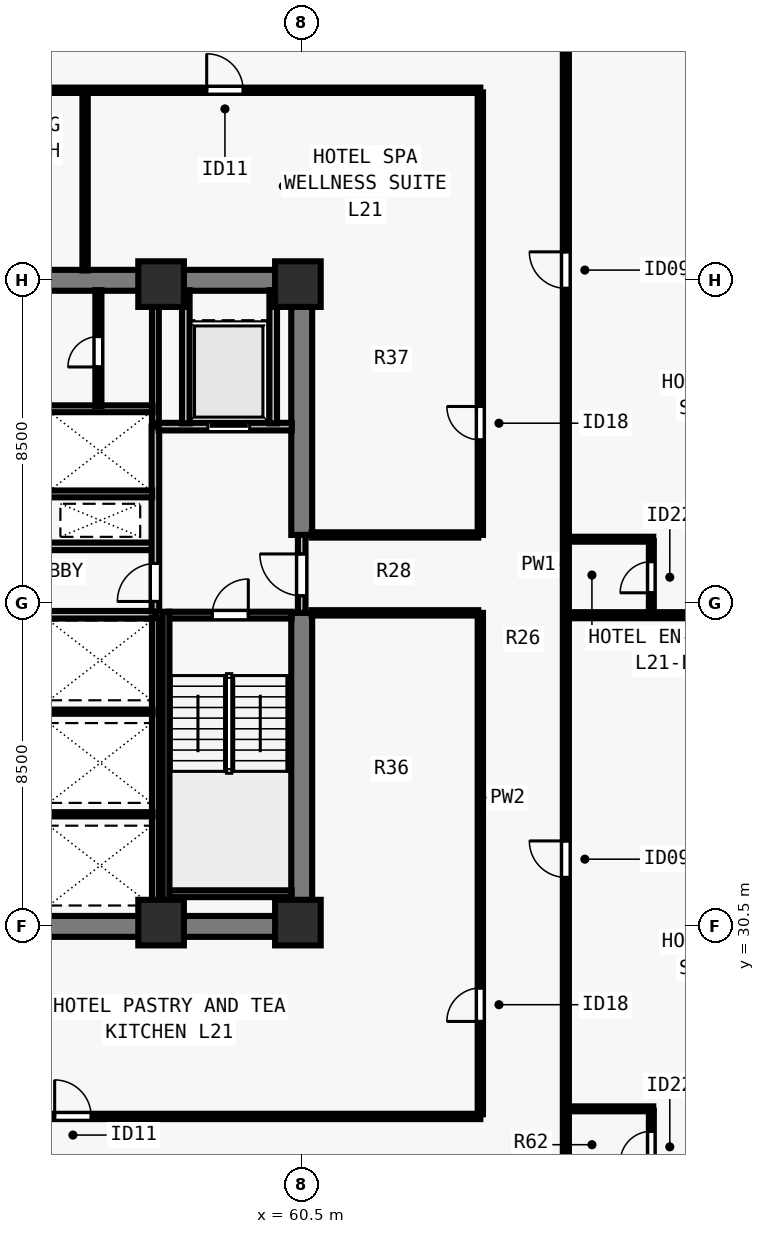
"""IFC4 building model, lengths in metres.
Left out: names, types, materials, properties, quantities, classifications, styles, units other than length and angle.
Written with IfcOpenShell. Run it as: python <this file> out.ifc"""

import sys

from ifc_helpers import new_model, si_unit, direction, frame, frame_2d, origin, origin_2d, place, context, subcontext, project, spatial, rectangle, extrude, element, fill, save


model = new_model("IFC4")
c1 = context("Model", 3, precision=1e-05, world=origin(), true_north=direction((0.0, 1.0)))
c2 = subcontext(c1, "Body", "Model", "MODEL_VIEW")
j1 = project(units=[si_unit("LENGTHUNIT", "METRE"), si_unit("PLANEANGLEUNIT", "RADIAN")], contexts=[c1])
p1 = place(None, origin())
s1 = spatial("IfcSite", under=j1, at=p1, CompositionType="ELEMENT")
p2 = place(p1, origin())
s2 = spatial("IfcBuilding", under=s1, at=p2, CompositionType="ELEMENT")
p3 = place(p2, frame((0.0, 0.0, 79.5)))
s3 = spatial("IfcBuildingStorey", under=s2, at=p3, CompositionType="ELEMENT", Elevation=79.5)
for number, where, z_axis, x_axis in (
    (1, (56.8, 30.6, 0.0), (0.0, 0.0, 1.0), (1.0, 0.0, 0.0)),
    (2, (60.4, 30.6, 0.0), (0.0, 0.0, 1.0), (1.0, 0.0, 0.0)),
    (3, (56.8, 47.4, 0.0), (0.0, 0.0, 1.0), (1.0, 0.0, 0.0)),
    (4, (60.4, 47.4, 0.0), (0.0, 0.0, 1.0), (1.0, 0.0, 0.0)),
):
    element("IfcColumn", number, at=place(p3, frame(where, z_axis=z_axis, x_axis=x_axis)), inside=s3, PredefinedType="COLUMN", context=c2, shape_type="SweptSolid", body=[
        extrude(rectangle(XDim=1.2, YDim=1.2, at=origin_2d()), origin(), (0.0, 0.0, 1.0), 3.5),
    ])
for number, where, z_axis, x_axis in (
    (5, (43.225, 30.5, 0.0), (0.0, 0.0, 1.0), (1.0, 0.0, 0.0)),
    (6, (43.225, 47.5, 0.0), (0.0, 0.0, 1.0), (1.0, 0.0, 0.0)),
):
    element("IfcWall", number, at=place(p3, frame(where, z_axis=z_axis, x_axis=x_axis)), inside=s3, PredefinedType="SHEAR", context=c2, shape_type="SweptSolid", body=[
        extrude(rectangle(XDim=17.55, YDim=0.55, at=frame_2d((8.775, 0.0))), origin(), (0.0, 0.0, 1.0), 3.28),
    ])
p4 = place(p3, frame((60.5, 30.765, 0.0), z_axis=(0.0, 0.0, 1.0), x_axis=(0.0, 1.0, 0.0)))
e7 = element("IfcWall", 7, at=p4, inside=s3, PredefinedType="SHEAR", context=c2, shape_type="SweptSolid", body=[
    extrude(rectangle(XDim=7.985, YDim=0.55, at=frame_2d((3.993, 0.0))), origin(), (0.0, 0.0, 1.0), 3.28),
])
p5 = place(p3, frame((60.5, 40.8, 0.0), z_axis=(0.0, 0.0, 1.0), x_axis=(0.0, 1.0, 0.0)))
e8 = element("IfcWall", 8, at=p5, inside=s3, PredefinedType="SHEAR", context=c2, shape_type="SweptSolid", body=[
    extrude(rectangle(XDim=6.435, YDim=0.55, at=frame_2d((3.218, 0.0))), origin(), (0.0, 0.0, 1.0), 3.28),
])
for number, where, z_axis, x_axis in (
    (9, (53.7, 38.7, 0.0), (0.0, 0.0, 1.0), (1.0, 0.0, 0.0)),
    (10, (53.7, 40.5, 0.0), (0.0, 0.0, 1.0), (1.0, 0.0, 0.0)),
):
    element("IfcWall", number, at=place(p3, frame(where, z_axis=z_axis, x_axis=x_axis)), inside=s3, PredefinedType="SOLIDWALL", context=c2, shape_type="SweptSolid", body=[
        extrude(rectangle(XDim=2.95, YDim=0.2, at=frame_2d((1.475, 0.0))), origin(), (0.0, 0.0, 1.0), 3.28),
    ])
p6 = place(p3, frame((60.5, 38.75, 0.0), z_axis=(0.0, 0.0, 1.0), x_axis=(0.0, 1.0, 0.0)))
e11 = element("IfcWall", 11, at=p6, inside=s3, PredefinedType="SOLIDWALL", context=c2, shape_type="SweptSolid", body=[
    extrude(rectangle(XDim=2.05, YDim=0.2, at=frame_2d((1.025, 0.0))), origin(), (0.0, 0.0, 1.0), 3.28),
])
p7 = place(p6, frame((0.45, 0.0, 0.0)))
e12 = element("IfcOpeningElement", 12, at=p7, cuts=e11, PredefinedType="OPENING", context=c2, shape_type="SweptSolid", body=[
    extrude(rectangle(XDim=1.1, YDim=2.15, at=frame_2d((0.55, 1.075))), frame((0.0, 0.11, 0.0), z_axis=(0.0, -1.0, 0.0), x_axis=(1.0, 0.0, 0.0)), (0.0, 0.0, 1.0), 0.22),
])
p8 = place(p3, frame((56.65, 38.785, 0.0), z_axis=(0.0, 0.0, 1.0), x_axis=(0.0, 1.0, 0.0)))
e13 = element("IfcWall", 13, at=p8, inside=s3, PredefinedType="SOLIDWALL", context=c2, shape_type="SweptSolid", body=[
    extrude(rectangle(XDim=4.865, YDim=0.2, at=frame_2d((2.433, 0.0))), origin(), (0.0, 0.0, 1.0), 3.28),
])
p9 = place(p8, frame((0.265, 0.0, 0.0)))
e14 = element("IfcOpeningElement", 14, at=p9, cuts=e13, PredefinedType="OPENING", context=c2, shape_type="SweptSolid", body=[
    extrude(rectangle(XDim=1.0, YDim=2.15, at=frame_2d((0.5, 1.075))), frame((0.0, 0.11, 0.0), z_axis=(0.0, -1.0, 0.0), x_axis=(1.0, 0.0, 0.0)), (0.0, 0.0, 1.0), 0.22),
])
p10 = place(p3, frame((56.735, 43.65, 0.0), z_axis=(0.0, 0.0, 1.0), x_axis=(1.0, 0.0, 0.0)))
e15 = element("IfcWall", 15, at=p10, inside=s3, PredefinedType="SOLIDWALL", context=c2, shape_type="SweptSolid", body=[
    extrude(rectangle(XDim=3.505, YDim=0.2, at=frame_2d((1.752, 0.0))), origin(), (0.0, 0.0, 1.0), 3.28),
])
p11 = place(p10, frame((1.295, 0.0, 0.0)))
e16 = element("IfcOpeningElement", 16, at=p11, cuts=e15, PredefinedType="OPENING", context=c2, shape_type="SweptSolid", body=[
    extrude(rectangle(XDim=1.1, YDim=2.2, at=frame_2d((0.55, 1.1))), frame((0.0, 0.11, 0.0), z_axis=(0.0, -1.0, 0.0), x_axis=(1.0, 0.0, 0.0)), (0.0, 0.0, 1.0), 0.22),
])
for number, where, z_axis, x_axis in (
    (17, (57.45, 43.735, 0.0), (0.0, 0.0, 1.0), (0.0, 1.0, 0.0)),
    (18, (59.75, 43.735, 0.0), (0.0, 0.0, 1.0), (0.0, 1.0, 0.0)),
):
    element("IfcWall", number, at=place(p3, frame(where, z_axis=z_axis, x_axis=x_axis)), inside=s3, PredefinedType="SOLIDWALL", context=c2, shape_type="SweptSolid", body=[
        extrude(rectangle(XDim=3.505, YDim=0.2, at=frame_2d((1.752, 0.0))), origin(), (0.0, 0.0, 1.0), 3.28),
    ])
p12 = place(p3, frame((56.65, 30.76, 0.0), z_axis=(0.0, 0.0, 1.0), x_axis=(0.0, 1.0, 0.0)))
e19 = element("IfcWall", 19, at=p12, inside=s3, PredefinedType="SOLIDWALL", context=c2, shape_type="SweptSolid", body=[
    extrude(rectangle(XDim=7.855, YDim=0.18, at=frame_2d((3.927, 0.0))), origin(), (0.0, 0.0, 1.0), 3.28),
])
for number, where, z_axis, x_axis in (
    (20, (53.785, 33.45, 0.0), (0.0, 0.0, 1.0), (1.0, 0.0, 0.0)),
    (21, (53.785, 36.15, 0.0), (0.0, 0.0, 1.0), (1.0, 0.0, 0.0)),
):
    element("IfcWall", number, at=place(p3, frame(where, z_axis=z_axis, x_axis=x_axis)), inside=s3, PredefinedType="PARTITIONING", context=c2, shape_type="SweptSolid", body=[
        extrude(rectangle(XDim=2.79, YDim=0.11, at=frame_2d((1.395, 0.0))), origin(), (0.0, 0.0, 1.0), 3.28),
    ])
p13 = place(p3, frame((56.65, 43.735, 0.0), z_axis=(0.0, 0.0, 1.0), x_axis=(0.0, 1.0, 0.0)))
e22 = element("IfcWall", 22, at=p13, inside=s3, PredefinedType="SOLIDWALL", context=c2, shape_type="SweptSolid", body=[
    extrude(rectangle(XDim=3.505, YDim=0.18, at=frame_2d((1.752, 0.0))), origin(), (0.0, 0.0, 1.0), 3.28),
])
p14 = place(p3, frame((53.785, 41.88, 0.0), z_axis=(0.0, 0.0, 1.0), x_axis=(1.0, 0.0, 0.0)))
e23 = element("IfcWall", 23, at=p14, inside=s3, PredefinedType="SOLIDWALL", context=c2, shape_type="SweptSolid", body=[
    extrude(rectangle(XDim=2.78, YDim=0.18, at=frame_2d((1.39, 0.0))), origin(), (0.0, 0.0, 1.0), 3.28),
])
p15 = place(p3, frame((53.785, 44.12, 0.0), z_axis=(0.0, 0.0, 1.0), x_axis=(1.0, 0.0, 0.0)))
e24 = element("IfcWall", 24, at=p15, inside=s3, PredefinedType="SOLIDWALL", context=c2, shape_type="SweptSolid", body=[
    extrude(rectangle(XDim=2.79, YDim=0.18, at=frame_2d((1.395, 0.0))), origin(), (0.0, 0.0, 1.0), 3.28),
])
p16 = place(p3, frame((55.15, 44.195, 0.0), z_axis=(0.0, 0.0, 1.0), x_axis=(0.0, 1.0, 0.0)))
e25 = element("IfcWall", 25, at=p16, inside=s3, PredefinedType="PARTITIONING", context=c2, shape_type="SweptSolid", body=[
    extrude(rectangle(XDim=3.045, YDim=0.16, at=frame_2d((1.522, 0.0))), origin(), (0.0, 0.0, 1.0), 3.28),
])
p17 = place(p16, frame((1.025, 0.0, 0.0)))
e26 = element("IfcOpeningElement", 26, at=p17, cuts=e25, PredefinedType="OPENING", context=c2, shape_type="SweptSolid", body=[
    extrude(rectangle(XDim=0.8, YDim=2.1, at=frame_2d((0.4, 1.05))), frame((0.0, 0.09, 0.0), z_axis=(0.0, -1.0, 0.0), x_axis=(1.0, 0.0, 0.0)), (0.0, 0.0, 1.0), 0.18),
])
p18 = place(p3, frame((67.45, 23.315, 0.0), z_axis=(0.0, 0.0, 1.0), x_axis=(0.0, 1.0, 0.0)))
e27 = element("IfcWall", 27, at=p18, inside=s3, PredefinedType="PARTITIONING", context=c2, shape_type="SweptSolid", body=[
    extrude(rectangle(XDim=31.37, YDim=0.16, at=frame_2d((15.685, 0.0))), origin(), (0.0, 0.0, 1.0), 3.28),
])
p19 = place(p18, frame((8.474, 0.0, 0.0)))
e28 = element("IfcOpeningElement", 28, at=p19, cuts=e27, PredefinedType="OPENING", context=c2, shape_type="SweptSolid", body=[
    extrude(rectangle(XDim=0.96, YDim=2.15, at=frame_2d((0.48, 1.075))), frame((0.0, 0.09, 0.0), z_axis=(0.0, -1.0, 0.0), x_axis=(1.0, 0.0, 0.0)), (0.0, 0.0, 1.0), 0.18),
])
p20 = place(p18, frame((23.974, 0.0, 0.0)))
e29 = element("IfcOpeningElement", 29, at=p20, cuts=e27, PredefinedType="OPENING", context=c2, shape_type="SweptSolid", body=[
    extrude(rectangle(XDim=0.96, YDim=2.15, at=frame_2d((0.48, 1.075))), frame((0.0, 0.09, 0.0), z_axis=(0.0, -1.0, 0.0), x_axis=(1.0, 0.0, 0.0)), (0.0, 0.0, 1.0), 0.18),
])
p21 = place(p3, frame((38.8, 25.5, 0.0), z_axis=(0.0, 0.0, 1.0), x_axis=(1.0, 0.0, 0.0)))
e30 = element("IfcWall", 30, at=p21, inside=s3, PredefinedType="PARTITIONING", context=c2, shape_type="SweptSolid", body=[
    extrude(rectangle(XDim=26.4, YDim=0.14, at=frame_2d((13.2, 0.0))), origin(), (0.0, 0.0, 1.0), 3.28),
])
p22 = place(p21, frame((2.2, 0.0, 0.0)))
e31 = element("IfcOpeningElement", 31, at=p22, cuts=e30, PredefinedType="OPENING", context=c2, shape_type="SweptSolid", body=[
    extrude(rectangle(XDim=0.96, YDim=2.12, at=frame_2d((0.48, 1.06))), frame((0.0, 0.08, 0.0), z_axis=(0.0, -1.0, 0.0), x_axis=(1.0, 0.0, 0.0)), (0.0, 0.0, 1.0), 0.16),
])
p23 = place(p21, frame((15.2, 0.0, 0.0)))
e32 = element("IfcOpeningElement", 32, at=p23, cuts=e30, PredefinedType="OPENING", context=c2, shape_type="SweptSolid", body=[
    extrude(rectangle(XDim=0.96, YDim=2.12, at=frame_2d((0.48, 1.06))), frame((0.0, 0.08, 0.0), z_axis=(0.0, -1.0, 0.0), x_axis=(1.0, 0.0, 0.0)), (0.0, 0.0, 1.0), 0.16),
])
p24 = place(p3, frame((38.8, 52.5, 0.0), z_axis=(0.0, 0.0, 1.0), x_axis=(1.0, 0.0, 0.0)))
e33 = element("IfcWall", 33, at=p24, inside=s3, PredefinedType="PARTITIONING", context=c2, shape_type="SweptSolid", body=[
    extrude(rectangle(XDim=26.4, YDim=0.14, at=frame_2d((13.2, 0.0))), origin(), (0.0, 0.0, 1.0), 3.28),
])
p25 = place(p24, frame((3.2, 0.0, 0.0)))
e34 = element("IfcOpeningElement", 34, at=p25, cuts=e33, PredefinedType="OPENING", context=c2, shape_type="SweptSolid", body=[
    extrude(rectangle(XDim=0.96, YDim=2.12, at=frame_2d((0.48, 1.06))), frame((0.0, 0.08, 0.0), z_axis=(0.0, -1.0, 0.0), x_axis=(1.0, 0.0, 0.0)), (0.0, 0.0, 1.0), 0.16),
])
p26 = place(p24, frame((19.2, 0.0, 0.0)))
e35 = element("IfcOpeningElement", 35, at=p26, cuts=e33, PredefinedType="OPENING", context=c2, shape_type="SweptSolid", body=[
    extrude(rectangle(XDim=0.96, YDim=2.12, at=frame_2d((0.48, 1.06))), frame((0.0, 0.08, 0.0), z_axis=(0.0, -1.0, 0.0), x_axis=(1.0, 0.0, 0.0)), (0.0, 0.0, 1.0), 0.16),
])
p27 = place(p3, frame((65.2, 25.555, 0.0), z_axis=(0.0, 0.0, 1.0), x_axis=(0.0, 1.0, 0.0)))
e36 = element("IfcWall", 36, at=p27, inside=s3, PredefinedType="PARTITIONING", context=c2, shape_type="SweptSolid", body=[
    extrude(rectangle(XDim=13.195, YDim=0.14, at=frame_2d((6.598, 0.0))), origin(), (0.0, 0.0, 1.0), 3.28),
])
p28 = place(p27, frame((2.445, 0.0, 0.0)))
e37 = element("IfcOpeningElement", 37, at=p28, cuts=e36, PredefinedType="OPENING", context=c2, shape_type="SweptSolid", body=[
    extrude(rectangle(XDim=0.88, YDim=2.1, at=frame_2d((0.44, 1.05))), frame((0.0, 0.08, 0.0), z_axis=(0.0, -1.0, 0.0), x_axis=(1.0, 0.0, 0.0)), (0.0, 0.0, 1.0), 0.16),
])
p29 = place(p3, frame((65.2, 40.8, 0.0), z_axis=(0.0, 0.0, 1.0), x_axis=(0.0, 1.0, 0.0)))
e38 = element("IfcWall", 38, at=p29, inside=s3, PredefinedType="PARTITIONING", context=c2, shape_type="SweptSolid", body=[
    extrude(rectangle(XDim=11.645, YDim=0.14, at=frame_2d((5.823, 0.0))), origin(), (0.0, 0.0, 1.0), 3.28),
])
p30 = place(p29, frame((2.5, 0.0, 0.0)))
e39 = element("IfcOpeningElement", 39, at=p30, cuts=e38, PredefinedType="OPENING", context=c2, shape_type="SweptSolid", body=[
    extrude(rectangle(XDim=0.88, YDim=2.1, at=frame_2d((0.44, 1.05))), frame((0.0, 0.08, 0.0), z_axis=(0.0, -1.0, 0.0), x_axis=(1.0, 0.0, 0.0)), (0.0, 0.0, 1.0), 0.16),
])
for number, where, z_axis, x_axis in (
    (40, (60.76, 38.75, 0.0), (0.0, 0.0, 1.0), (1.0, 0.0, 0.0)),
    (41, (60.76, 40.8, 0.0), (0.0, 0.0, 1.0), (1.0, 0.0, 0.0)),
):
    element("IfcWall", number, at=place(p3, frame(where, z_axis=z_axis, x_axis=x_axis)), inside=s3, PredefinedType="PARTITIONING", context=c2, shape_type="SweptSolid", body=[
        extrude(rectangle(XDim=4.385, YDim=0.14, at=frame_2d((2.192, 0.0))), origin(), (0.0, 0.0, 1.0), 3.28),
    ])
p31 = place(p3, frame((54.8, 47.76, 0.0), z_axis=(0.0, 0.0, 1.0), x_axis=(0.0, 1.0, 0.0)))
e42 = element("IfcWall", 42, at=p31, inside=s3, PredefinedType="PARTITIONING", context=c2, shape_type="SweptSolid", body=[
    extrude(rectangle(XDim=4.685, YDim=0.14, at=frame_2d((2.343, 0.0))), origin(), (0.0, 0.0, 1.0), 3.28),
])
p32 = place(p3, frame((67.515, 25.7, 0.0), z_axis=(0.0, 0.0, 1.0), x_axis=(1.0, 0.0, 0.0)))
e43 = element("IfcWall", 43, at=p32, inside=s3, PredefinedType="PLUMBINGWALL", context=c2, shape_type="SweptSolid", body=[
    extrude(rectangle(XDim=2.235, YDim=0.13, at=frame_2d((1.118, 0.0))), origin(), (0.0, 0.0, 1.0), 3.28),
])
p33 = place(p3, frame((69.7, 23.75, 0.0), z_axis=(0.0, 0.0, 1.0), x_axis=(0.0, 1.0, 0.0)))
e44 = element("IfcWall", 44, at=p33, inside=s3, PredefinedType="PLUMBINGWALL", context=c2, shape_type="SweptSolid", body=[
    extrude(rectangle(XDim=1.9, YDim=0.13, at=frame_2d((0.95, 0.0))), origin(), (0.0, 0.0, 1.0), 3.28),
])
p34 = place(p33, frame((0.54, 0.0, 0.0)))
e45 = element("IfcOpeningElement", 45, at=p34, cuts=e44, PredefinedType="OPENING", context=c2, shape_type="SweptSolid", body=[
    extrude(rectangle(XDim=0.82, YDim=2.1, at=frame_2d((0.41, 1.05))), frame((0.0, 0.075, 0.0), z_axis=(0.0, -1.0, 0.0), x_axis=(1.0, 0.0, 0.0)), (0.0, 0.0, 1.0), 0.15),
])
p35 = place(p3, frame((67.515, 38.688, 0.0), z_axis=(0.0, 0.0, 1.0), x_axis=(1.0, 0.0, 0.0)))
e46 = element("IfcWall", 46, at=p35, inside=s3, PredefinedType="PARTITIONING", context=c2, shape_type="SweptSolid", body=[
    extrude(rectangle(XDim=9.64, YDim=0.16, at=frame_2d((4.82, 0.0))), origin(), (0.0, 0.0, 1.0), 3.28),
])
p36 = place(p3, frame((67.515, 40.688, 0.0), z_axis=(0.0, 0.0, 1.0), x_axis=(1.0, 0.0, 0.0)))
e47 = element("IfcWall", 47, at=p36, inside=s3, PredefinedType="PLUMBINGWALL", context=c2, shape_type="SweptSolid", body=[
    extrude(rectangle(XDim=2.235, YDim=0.13, at=frame_2d((1.118, 0.0))), origin(), (0.0, 0.0, 1.0), 3.28),
])
p37 = place(p3, frame((69.7, 38.753, 0.0), z_axis=(0.0, 0.0, 1.0), x_axis=(0.0, 1.0, 0.0)))
e48 = element("IfcWall", 48, at=p37, inside=s3, PredefinedType="PLUMBINGWALL", context=c2, shape_type="SweptSolid", body=[
    extrude(rectangle(XDim=1.885, YDim=0.13, at=frame_2d((0.942, 0.0))), origin(), (0.0, 0.0, 1.0), 3.28),
])
p38 = place(p37, frame((0.525, 0.0, 0.0)))
e49 = element("IfcOpeningElement", 49, at=p38, cuts=e48, PredefinedType="OPENING", context=c2, shape_type="SweptSolid", body=[
    extrude(rectangle(XDim=0.82, YDim=2.1, at=frame_2d((0.41, 1.05))), frame((0.0, 0.075, 0.0), z_axis=(0.0, -1.0, 0.0), x_axis=(1.0, 0.0, 0.0)), (0.0, 0.0, 1.0), 0.15),
])
p39 = place(p3, frame((57.005, 38.69, 0.0), z_axis=(0.0, 0.0, 1.0), x_axis=(1.0, 0.0, 0.0)))
e50 = element("IfcWall", 50, at=p39, inside=s3, PredefinedType="SOLIDWALL", context=c2, shape_type="SweptSolid", body=[
    extrude(rectangle(XDim=3.23, YDim=0.18, at=frame_2d((1.615, 0.0))), origin(), (0.0, 0.0, 1.0), 3.28),
])
p40 = place(p39, frame((1.14, 0.0, 0.0)))
e51 = element("IfcOpeningElement", 51, at=p40, cuts=e50, PredefinedType="OPENING", context=c2, shape_type="SweptSolid", body=[
    extrude(rectangle(XDim=0.95, YDim=2.15, at=frame_2d((0.475, 1.075))), frame((0.0, 0.1, 0.0), z_axis=(0.0, -1.0, 0.0), x_axis=(1.0, 0.0, 0.0)), (0.0, 0.0, 1.0), 0.2),
])
p41 = place(p3, frame((57.005, 31.36, 0.0), z_axis=(0.0, 0.0, 1.0), x_axis=(1.0, 0.0, 0.0)))
e52 = element("IfcWall", 52, at=p41, inside=s3, PredefinedType="SOLIDWALL", context=c2, shape_type="SweptSolid", body=[
    extrude(rectangle(XDim=3.23, YDim=0.18, at=frame_2d((1.615, 0.0))), origin(), (0.0, 0.0, 1.0), 3.28),
])
p42 = place(p3, frame((56.93, 38.78, 0.0), z_axis=(0.0, 0.0, 1.0), x_axis=(0.0, -1.0, 0.0)))
e53 = element("IfcWall", 53, at=p42, inside=s3, PredefinedType="SOLIDWALL", context=c2, shape_type="SweptSolid", body=[
    extrude(rectangle(XDim=8.017, YDim=0.18, at=frame_2d((4.009, 0.0))), origin(), (0.0, 0.0, 1.0), 3.28),
])
p43 = place(p7, origin())
e54 = element("IfcDoor", 54, at=p43, inside=s3, OperationType="SINGLE_SWING_RIGHT", PredefinedType="DOOR", context=c2, shape_type="SweptSolid", body=[
    extrude(rectangle(XDim=1.1, YDim=2.15, at=frame_2d((0.55, 1.075))), frame((0.0, 0.025, 0.0), z_axis=(0.0, -1.0, 0.0), x_axis=(1.0, 0.0, 0.0)), (0.0, 0.0, 1.0), 0.05),
])
fill(e12, e54)
p44 = place(p9, origin())
e55 = element("IfcDoor", 55, at=p44, inside=s3, OperationType="SINGLE_SWING_LEFT", PredefinedType="DOOR", context=c2, shape_type="SweptSolid", body=[
    extrude(rectangle(XDim=1.0, YDim=2.15, at=frame_2d((0.5, 1.075))), frame((0.0, 0.025, 0.0), z_axis=(0.0, -1.0, 0.0), x_axis=(1.0, 0.0, 0.0)), (0.0, 0.0, 1.0), 0.05),
])
fill(e14, e55)
p45 = place(p11, origin())
e56 = element("IfcDoor", 56, at=p45, inside=s3, OperationType="SLIDING_TO_LEFT", PredefinedType="DOOR", context=c2, shape_type="SweptSolid", body=[
    extrude(rectangle(XDim=1.1, YDim=2.2, at=frame_2d((0.55, 1.1))), frame((0.0, 0.025, 0.0), z_axis=(0.0, -1.0, 0.0), x_axis=(1.0, 0.0, 0.0)), (0.0, 0.0, 1.0), 0.05),
])
fill(e16, e56)
p46 = place(p17, origin())
e57 = element("IfcDoor", 57, at=p46, inside=s3, OperationType="SINGLE_SWING_LEFT", PredefinedType="DOOR", context=c2, shape_type="SweptSolid", body=[
    extrude(rectangle(XDim=0.8, YDim=2.1, at=frame_2d((0.4, 1.05))), frame((0.0, 0.025, 0.0), z_axis=(0.0, -1.0, 0.0), x_axis=(1.0, 0.0, 0.0)), (0.0, 0.0, 1.0), 0.05),
])
fill(e26, e57)
p47 = place(p23, origin())
e58 = element("IfcDoor", 58, at=p47, inside=s3, OperationType="SINGLE_SWING_LEFT", PredefinedType="DOOR", context=c2, shape_type="SweptSolid", body=[
    extrude(rectangle(XDim=0.96, YDim=2.12, at=frame_2d((0.48, 1.06))), frame((0.0, 0.025, 0.0), z_axis=(0.0, -1.0, 0.0), x_axis=(1.0, 0.0, 0.0)), (0.0, 0.0, 1.0), 0.05),
])
fill(e32, e58)
p48 = place(p26, origin())
e59 = element("IfcDoor", 59, at=p48, inside=s3, OperationType="SINGLE_SWING_LEFT", PredefinedType="DOOR", context=c2, shape_type="SweptSolid", body=[
    extrude(rectangle(XDim=0.96, YDim=2.12, at=frame_2d((0.48, 1.06))), frame((0.0, 0.025, 0.0), z_axis=(0.0, -1.0, 0.0), x_axis=(1.0, 0.0, 0.0)), (0.0, 0.0, 1.0), 0.05),
])
fill(e35, e59)
p49 = place(p28, origin())
e60 = element("IfcDoor", 60, at=p49, inside=s3, OperationType="SINGLE_SWING_LEFT", PredefinedType="DOOR", context=c2, shape_type="SweptSolid", body=[
    extrude(rectangle(XDim=0.88, YDim=2.1, at=frame_2d((0.44, 1.05))), frame((0.0, 0.025, 0.0), z_axis=(0.0, -1.0, 0.0), x_axis=(1.0, 0.0, 0.0)), (0.0, 0.0, 1.0), 0.05),
])
fill(e37, e60)
p50 = place(p30, origin())
e61 = element("IfcDoor", 61, at=p50, inside=s3, OperationType="SINGLE_SWING_RIGHT", PredefinedType="DOOR", context=c2, shape_type="SweptSolid", body=[
    extrude(rectangle(XDim=0.88, YDim=2.1, at=frame_2d((0.44, 1.05))), frame((0.0, 0.025, 0.0), z_axis=(0.0, -1.0, 0.0), x_axis=(1.0, 0.0, 0.0)), (0.0, 0.0, 1.0), 0.05),
])
fill(e39, e61)
p51 = place(p34, origin())
e62 = element("IfcDoor", 62, at=p51, inside=s3, OperationType="SINGLE_SWING_LEFT", PredefinedType="DOOR", context=c2, shape_type="SweptSolid", body=[
    extrude(rectangle(XDim=0.82, YDim=2.1, at=frame_2d((0.41, 1.05))), frame((0.0, 0.025, 0.0), z_axis=(0.0, -1.0, 0.0), x_axis=(1.0, 0.0, 0.0)), (0.0, 0.0, 1.0), 0.05),
])
fill(e45, e62)
p52 = place(p19, origin())
e63 = element("IfcDoor", 63, at=p52, inside=s3, OperationType="SINGLE_SWING_RIGHT", PredefinedType="DOOR", context=c2, shape_type="SweptSolid", body=[
    extrude(rectangle(XDim=0.96, YDim=2.15, at=frame_2d((0.48, 1.075))), frame((0.0, 0.025, 0.0), z_axis=(0.0, -1.0, 0.0), x_axis=(1.0, 0.0, 0.0)), (0.0, 0.0, 1.0), 0.05),
])
fill(e28, e63)
p53 = place(p38, origin())
e64 = element("IfcDoor", 64, at=p53, inside=s3, OperationType="SINGLE_SWING_LEFT", PredefinedType="DOOR", context=c2, shape_type="SweptSolid", body=[
    extrude(rectangle(XDim=0.82, YDim=2.1, at=frame_2d((0.41, 1.05))), frame((0.0, 0.025, 0.0), z_axis=(0.0, -1.0, 0.0), x_axis=(1.0, 0.0, 0.0)), (0.0, 0.0, 1.0), 0.05),
])
fill(e49, e64)
p54 = place(p20, origin())
e65 = element("IfcDoor", 65, at=p54, inside=s3, OperationType="SINGLE_SWING_RIGHT", PredefinedType="DOOR", context=c2, shape_type="SweptSolid", body=[
    extrude(rectangle(XDim=0.96, YDim=2.15, at=frame_2d((0.48, 1.075))), frame((0.0, 0.025, 0.0), z_axis=(0.0, -1.0, 0.0), x_axis=(1.0, 0.0, 0.0)), (0.0, 0.0, 1.0), 0.05),
])
fill(e29, e65)
p55 = place(p40, origin())
e66 = element("IfcDoor", 66, at=p55, inside=s3, OperationType="SINGLE_SWING_RIGHT", PredefinedType="DOOR", context=c2, shape_type="SweptSolid", body=[
    extrude(rectangle(XDim=0.95, YDim=2.15, at=frame_2d((0.475, 1.075))), frame((0.0, 0.025, 0.0), z_axis=(0.0, -1.0, 0.0), x_axis=(1.0, 0.0, 0.0)), (0.0, 0.0, 1.0), 0.05),
])
fill(e51, e66)
save(model, sys.argv[1])
